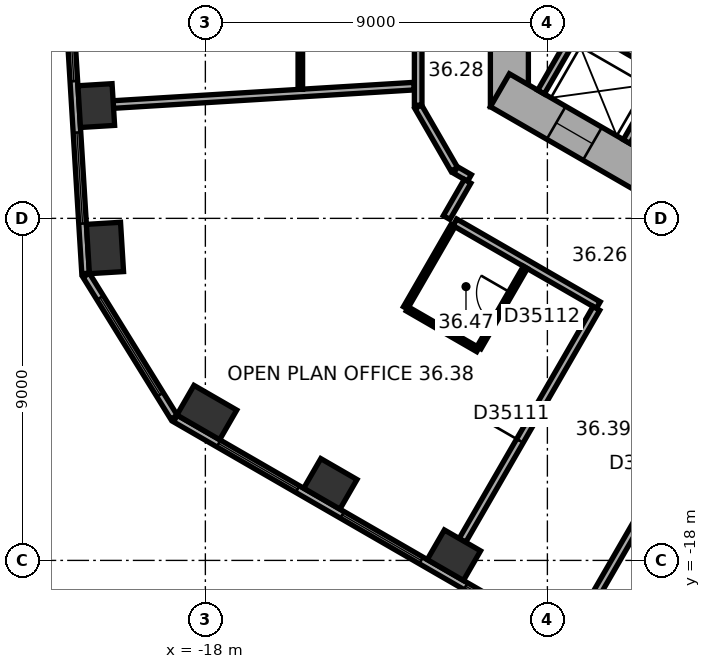
"""IFC4 building model, lengths in metres.
Left out: names, types, materials, properties, quantities, classifications, styles, units other than length and angle.
Written with IfcOpenShell. Run it as: python <this file> out.ifc"""

import sys

from ifc_helpers import new_model, si_unit, direction, frame, frame_2d, origin, origin_2d, place, context, subcontext, project, spatial, rectangle, extrude, element, fill, save


model = new_model("IFC4")
c1 = context("Model", 3, precision=1e-05, world=origin(), true_north=direction((0.0, 1.0)))
c2 = subcontext(c1, "Body", "Model", "MODEL_VIEW")
j1 = project(units=[si_unit("LENGTHUNIT", "METRE"), si_unit("PLANEANGLEUNIT", "RADIAN")], contexts=[c1])
p1 = place(None, origin())
s1 = spatial("IfcSite", under=j1, at=p1, CompositionType="ELEMENT")
p2 = place(p1, origin())
s2 = spatial("IfcBuilding", under=s1, at=p2, CompositionType="ELEMENT")
p3 = place(p2, frame((0.0, 0.0, 150.3)))
s3 = spatial("IfcBuildingStorey", under=s2, at=p3, CompositionType="ELEMENT", Elevation=150.3)
p4 = place(p3, frame((-20.871, -6.032, 0.0), z_axis=(0.0, 0.0, 1.0), x_axis=(0.061048539535, -0.998134798422, 0.0)))
e1 = element("IfcColumn", 1, at=p4, inside=s3, PredefinedType="COLUMN", context=c2, shape_type="SweptSolid", body=[
    extrude(rectangle(XDim=1.1, YDim=0.9, at=origin_2d()), origin(), (0.0, 0.0, 1.0), 3.7),
])
for number, where, z_axis, x_axis in (
    (2, (-20.642, -9.779, 0.0), (0.0, 0.0, 1.0), (0.061, -0.998, 0.0)),
    (3, (-17.962, -14.109, 0.0), (0.0, 0.0, 1.0), (0.866, -0.5, 0.0)),
):
    element("IfcColumn", number, at=place(p3, frame(where, z_axis=z_axis, x_axis=x_axis)), inside=s3, PredefinedType="COLUMN", context=c2, shape_type="SweptSolid", body=[
        extrude(rectangle(XDim=1.3, YDim=0.9, at=origin_2d()), origin(), (0.0, 0.0, 1.0), 3.7),
    ])
for number, where, z_axis, x_axis in (
    (4, (-14.711, -15.986, 0.0), (0.0, 0.0, 1.0), (0.866, -0.5, 0.0)),
    (5, (-11.46, -17.863, 0.0), (0.0, 0.0, 1.0), (0.866, -0.5, 0.0)),
):
    element("IfcColumn", number, at=place(p3, frame(where, z_axis=z_axis, x_axis=x_axis)), inside=s3, PredefinedType="COLUMN", context=c2, shape_type="SweptSolid", body=[
        extrude(rectangle(XDim=1.1, YDim=0.9, at=origin_2d()), origin(), (0.0, 0.0, 1.0), 3.7),
    ])
p5 = place(p3, frame((-10.0, 6.062, 0.0), z_axis=(0.0, 0.0, 1.0), x_axis=(0.0, -1.0, 0.0)))
e6 = element("IfcWall", 6, at=p5, inside=s3, PredefinedType="SHEAR", context=c2, shape_type="SweptSolid", body=[
    extrude(rectangle(XDim=12.125, YDim=1.0, at=frame_2d((6.062, 0.0))), origin(), (0.0, 0.0, 1.0), 3.7),
])
p6 = place(p5, frame((5.212, 0.0, 0.0)))
e7 = element("IfcOpeningElement", 7, at=p6, cuts=e6, PredefinedType="OPENING", context=c2, shape_type="SweptSolid", body=[
    extrude(rectangle(XDim=1.1, YDim=2.1, at=frame_2d((0.55, 1.05))), frame((0.0, 0.51, 0.0), z_axis=(0.0, -1.0, 0.0), x_axis=(1.0, 0.0, 0.0)), (0.0, 0.0, 1.0), 1.02),
])
p7 = place(p5, frame((7.812, 0.0, 0.0)))
e8 = element("IfcOpeningElement", 8, at=p7, cuts=e6, PredefinedType="OPENING", context=c2, shape_type="SweptSolid", body=[
    extrude(rectangle(XDim=1.1, YDim=2.1, at=frame_2d((0.55, 1.05))), frame((0.0, 0.51, 0.0), z_axis=(0.0, -1.0, 0.0), x_axis=(1.0, 0.0, 0.0)), (0.0, 0.0, 1.0), 1.02),
])
p8 = place(p3, frame((-10.25, -5.629, 0.0), z_axis=(0.0, 0.0, 1.0), x_axis=(0.866022616891, -0.50000482701, 0.0)))
e9 = element("IfcWall", 9, at=p8, inside=s3, PredefinedType="SHEAR", context=c2, shape_type="SweptSolid", body=[
    extrude(rectangle(XDim=12.125, YDim=1.0, at=frame_2d((6.062, 0.0))), origin(), (0.0, 0.0, 1.0), 3.7),
])
p9 = place(p8, frame((6.262, 0.0, 0.0)))
e10 = element("IfcOpeningElement", 10, at=p9, cuts=e9, PredefinedType="OPENING", context=c2, shape_type="SweptSolid", body=[
    extrude(rectangle(XDim=1.5, YDim=2.1, at=frame_2d((0.75, 1.05))), frame((0.0, 0.51, 0.0), z_axis=(0.0, -1.0, 0.0), x_axis=(1.0, 0.0, 0.0)), (0.0, 0.0, 1.0), 1.02),
])
p10 = place(p8, frame((1.712, 0.0, 0.0)))
e11 = element("IfcOpeningElement", 11, at=p10, cuts=e9, PredefinedType="OPENING", context=c2, shape_type="SweptSolid", body=[
    extrude(rectangle(XDim=1.1, YDim=2.1, at=frame_2d((0.55, 1.05))), frame((0.0, 0.51, 0.0), z_axis=(0.0, -1.0, 0.0), x_axis=(1.0, 0.0, 0.0)), (0.0, 0.0, 1.0), 1.02),
])
p11 = place(p8, frame((4.312, 0.0, 0.0)))
e12 = element("IfcOpeningElement", 12, at=p11, cuts=e9, PredefinedType="OPENING", context=c2, shape_type="SweptSolid", body=[
    extrude(rectangle(XDim=1.1, YDim=2.1, at=frame_2d((0.55, 1.05))), frame((0.0, 0.51, 0.0), z_axis=(0.0, -1.0, 0.0), x_axis=(1.0, 0.0, 0.0)), (0.0, 0.0, 1.0), 1.02),
])
p12 = place(p3, frame((-22.375, 9.557, 0.0), z_axis=(0.0, 0.0, 1.0), x_axis=(0.061036015339, -0.998135564356, 0.0)))
e13 = element("IfcWall", 13, at=p12, inside=s3, PredefinedType="STANDARD", context=c2, shape_type="SweptSolid", body=[
    extrude(rectangle(XDim=20.044, YDim=0.2, at=frame_2d((10.022, 0.0))), origin(), (0.0, 0.0, 1.0), 3.7),
])
p13 = place(p12, frame((1.313, 0.0, 0.9)))
e14 = element("IfcOpeningElement", 14, at=p13, cuts=e13, PredefinedType="OPENING", context=c2, shape_type="SweptSolid", body=[
    extrude(rectangle(XDim=2.4, YDim=2.0, at=frame_2d((1.2, 1.0))), frame((0.0, 0.11, 0.0), z_axis=(0.0, -1.0, 0.0), x_axis=(1.0, 0.0, 0.0)), (0.0, 0.0, 1.0), 0.22),
])
p14 = place(p12, frame((5.067, 0.0, 0.9)))
e15 = element("IfcOpeningElement", 15, at=p14, cuts=e13, PredefinedType="OPENING", context=c2, shape_type="SweptSolid", body=[
    extrude(rectangle(XDim=2.4, YDim=2.0, at=frame_2d((1.2, 1.0))), frame((0.0, 0.11, 0.0), z_axis=(0.0, -1.0, 0.0), x_axis=(1.0, 0.0, 0.0)), (0.0, 0.0, 1.0), 0.22),
])
p15 = place(p12, frame((8.821, 0.0, 0.9)))
e16 = element("IfcOpeningElement", 16, at=p15, cuts=e13, PredefinedType="OPENING", context=c2, shape_type="SweptSolid", body=[
    extrude(rectangle(XDim=2.4, YDim=2.0, at=frame_2d((1.2, 1.0))), frame((0.0, 0.11, 0.0), z_axis=(0.0, -1.0, 0.0), x_axis=(1.0, 0.0, 0.0)), (0.0, 0.0, 1.0), 0.22),
])
p16 = place(p12, frame((12.575, 0.0, 0.9)))
e17 = element("IfcOpeningElement", 17, at=p16, cuts=e13, PredefinedType="OPENING", context=c2, shape_type="SweptSolid", body=[
    extrude(rectangle(XDim=2.4, YDim=2.0, at=frame_2d((1.2, 1.0))), frame((0.0, 0.11, 0.0), z_axis=(0.0, -1.0, 0.0), x_axis=(1.0, 0.0, 0.0)), (0.0, 0.0, 1.0), 0.22),
])
p17 = place(p12, frame((16.329, 0.0, 0.9)))
e18 = element("IfcOpeningElement", 18, at=p17, cuts=e13, PredefinedType="OPENING", context=c2, shape_type="SweptSolid", body=[
    extrude(rectangle(XDim=2.4, YDim=2.0, at=frame_2d((1.2, 1.0))), frame((0.0, 0.11, 0.0), z_axis=(0.0, -1.0, 0.0), x_axis=(1.0, 0.0, 0.0)), (0.0, 0.0, 1.0), 0.22),
])
p18 = place(p3, frame((-21.137, -10.496, 0.0), z_axis=(0.0, 0.0, 1.0), x_axis=(0.526178661629, -0.850374044786, 0.0)))
e19 = element("IfcWall", 19, at=p18, inside=s3, PredefinedType="STANDARD", context=c2, shape_type="SweptSolid", body=[
    extrude(rectangle(XDim=4.395, YDim=0.2, at=frame_2d((2.197, 0.0))), origin(), (0.0, 0.0, 1.0), 3.7),
])
p19 = place(p18, frame((0.698, 0.0, 0.9)))
e20 = element("IfcOpeningElement", 20, at=p19, cuts=e19, PredefinedType="OPENING", context=c2, shape_type="SweptSolid", body=[
    extrude(rectangle(XDim=3.0, YDim=2.0, at=frame_2d((1.5, 1.0))), frame((0.0, 0.11, 0.0), z_axis=(0.0, -1.0, 0.0), x_axis=(1.0, 0.0, 0.0)), (0.0, 0.0, 1.0), 0.22),
])
p20 = place(p3, frame((-18.789, -14.267, 0.0), z_axis=(0.0, 0.0, 1.0), x_axis=(0.866023315909, -0.500003616288, 0.0)))
e21 = element("IfcWall", 21, at=p20, inside=s3, PredefinedType="STANDARD", context=c2, shape_type="SweptSolid", body=[
    extrude(rectangle(XDim=20.044, YDim=0.2, at=frame_2d((10.022, 0.0))), origin(), (0.0, 0.0, 1.0), 3.7),
])
p21 = place(p20, frame((1.314, 0.0, 0.9)))
e22 = element("IfcOpeningElement", 22, at=p21, cuts=e21, PredefinedType="OPENING", context=c2, shape_type="SweptSolid", body=[
    extrude(rectangle(XDim=2.4, YDim=2.0, at=frame_2d((1.2, 1.0))), frame((0.0, 0.11, 0.0), z_axis=(0.0, -1.0, 0.0), x_axis=(1.0, 0.0, 0.0)), (0.0, 0.0, 1.0), 0.22),
])
p22 = place(p20, frame((5.069, 0.0, 0.9)))
e23 = element("IfcOpeningElement", 23, at=p22, cuts=e21, PredefinedType="OPENING", context=c2, shape_type="SweptSolid", body=[
    extrude(rectangle(XDim=2.4, YDim=2.0, at=frame_2d((1.2, 1.0))), frame((0.0, 0.11, 0.0), z_axis=(0.0, -1.0, 0.0), x_axis=(1.0, 0.0, 0.0)), (0.0, 0.0, 1.0), 0.22),
])
p23 = place(p20, frame((8.823, 0.0, 0.9)))
e24 = element("IfcOpeningElement", 24, at=p23, cuts=e21, PredefinedType="OPENING", context=c2, shape_type="SweptSolid", body=[
    extrude(rectangle(XDim=2.4, YDim=2.0, at=frame_2d((1.2, 1.0))), frame((0.0, 0.11, 0.0), z_axis=(0.0, -1.0, 0.0), x_axis=(1.0, 0.0, 0.0)), (0.0, 0.0, 1.0), 0.22),
])
p24 = place(p20, frame((12.577, 0.0, 0.9)))
e25 = element("IfcOpeningElement", 25, at=p24, cuts=e21, PredefinedType="OPENING", context=c2, shape_type="SweptSolid", body=[
    extrude(rectangle(XDim=2.4, YDim=2.0, at=frame_2d((1.2, 1.0))), frame((0.0, 0.11, 0.0), z_axis=(0.0, -1.0, 0.0), x_axis=(1.0, 0.0, 0.0)), (0.0, 0.0, 1.0), 0.22),
])
p25 = place(p20, frame((16.331, 0.0, 0.9)))
e26 = element("IfcOpeningElement", 26, at=p25, cuts=e21, PredefinedType="OPENING", context=c2, shape_type="SweptSolid", body=[
    extrude(rectangle(XDim=2.4, YDim=2.0, at=frame_2d((1.2, 1.0))), frame((0.0, 0.11, 0.0), z_axis=(0.0, -1.0, 0.0), x_axis=(1.0, 0.0, 0.0)), (0.0, 0.0, 1.0), 0.22),
])
p26 = place(p3, frame((-8.203, -3.809, 0.0), z_axis=(0.0, 0.0, 1.0), x_axis=(0.866028230842, -0.499995103361, 0.0)))
e27 = element("IfcWall", 27, at=p26, inside=s3, PredefinedType="PARTITIONING", context=c2, shape_type="SweptSolid", body=[
    extrude(rectangle(XDim=5.4, YDim=0.2, at=frame_2d((2.7, 0.0))), origin(), (0.0, 0.0, 1.0), 3.42),
])
for number, where, z_axis, x_axis in (
    (28, (-8.067, -3.772, 0.0), (0.0, 0.0, 1.0), (-0.5, -0.866, 0.0)),
    (29, (-5.815, -5.072, 0.0), (0.0, 0.0, 1.0), (-0.5, -0.866, 0.0)),
):
    element("IfcWall", number, at=place(p3, frame(where, z_axis=z_axis, x_axis=x_axis)), inside=s3, PredefinedType="PARTITIONING", context=c2, shape_type="SweptSolid", body=[
        extrude(rectangle(XDim=2.2, YDim=0.2, at=frame_2d((1.1, 0.0))), origin(), (0.0, 0.0, 1.0), 3.42),
    ])
p27 = place(p3, frame((-20.421, -6.005, 0.0), z_axis=(0.0, 0.0, 1.0), x_axis=(0.998134865741, 0.061047438866, 0.0)))
e30 = element("IfcWall", 30, at=p27, inside=s3, PredefinedType="PARTITIONING", context=c2, shape_type="SweptSolid", body=[
    extrude(rectangle(XDim=7.927, YDim=0.2, at=frame_2d((3.963, 0.0))), origin(), (0.0, 0.0, 1.0), 2.87),
])
p28 = place(p3, frame((-15.501, 5.479, 0.0), z_axis=(0.0, 0.0, 1.0), x_axis=(0.0, -1.0, 0.0)))
e31 = element("IfcWall", 31, at=p28, inside=s3, PredefinedType="PARTITIONING", context=c2, shape_type="SweptSolid", body=[
    extrude(rectangle(XDim=11.083, YDim=0.12, at=frame_2d((5.542, 0.0))), origin(), (0.0, 0.0, 1.0), 3.42),
])
p29 = place(p28, frame((0.55, 0.0, 0.0)))
e32 = element("IfcOpeningElement", 32, at=p29, cuts=e31, PredefinedType="OPENING", context=c2, shape_type="SweptSolid", body=[
    extrude(rectangle(XDim=1.0, YDim=2.1, at=frame_2d((0.5, 1.05))), frame((0.0, 0.07, 0.0), z_axis=(0.0, -1.0, 0.0), x_axis=(1.0, 0.0, 0.0)), (0.0, 0.0, 1.0), 0.14),
])
p30 = place(p28, frame((3.636, 0.0, 0.0)))
e33 = element("IfcOpeningElement", 33, at=p30, cuts=e31, PredefinedType="OPENING", context=c2, shape_type="SweptSolid", body=[
    extrude(rectangle(XDim=0.9, YDim=2.1, at=frame_2d((0.45, 1.05))), frame((0.0, 0.07, 0.0), z_axis=(0.0, -1.0, 0.0), x_axis=(1.0, 0.0, 0.0)), (0.0, 0.0, 1.0), 0.14),
])
p31 = place(p28, frame((8.127, 0.0, 0.0)))
e34 = element("IfcOpeningElement", 34, at=p31, cuts=e31, PredefinedType="OPENING", context=c2, shape_type="SweptSolid", body=[
    extrude(rectangle(XDim=0.9, YDim=2.1, at=frame_2d((0.45, 1.05))), frame((0.0, 0.07, 0.0), z_axis=(0.0, -1.0, 0.0), x_axis=(1.0, 0.0, 0.0)), (0.0, 0.0, 1.0), 0.14),
])
p32 = place(p3, frame((-12.735, -11.355, 0.0), z_axis=(0.0, 0.0, 1.0), x_axis=(0.500004234368, 0.866022959057, 0.0)))
e35 = element("IfcWall", 35, at=p32, inside=s3, PredefinedType="PARTITIONING", context=c2, shape_type="SweptSolid", body=[
    extrude(rectangle(XDim=2.5, YDim=0.12, at=frame_2d((1.25, 0.0))), origin(), (0.0, 0.0, 1.0), 3.42),
])
p33 = place(p3, frame((-12.4, -6.062, 0.0), z_axis=(0.0, 0.0, 1.0), x_axis=(0.500022797313, -0.86601224135, 0.0)))
e36 = element("IfcWall", 36, at=p33, inside=s3, PredefinedType="PARTITIONING", context=c2, shape_type="SweptSolid", body=[
    extrude(rectangle(XDim=1.9, YDim=0.2, at=frame_2d((0.95, 0.0))), origin(), (0.0, 0.0, 1.0), 3.42),
])
p34 = place(p3, frame((-12.4, -4.201, 0.0), z_axis=(0.0, 0.0, 1.0), x_axis=(0.0, -1.0, 0.0)))
e37 = element("IfcWall", 37, at=p34, inside=s3, PredefinedType="PARTITIONING", context=c2, shape_type="SweptSolid", body=[
    extrude(rectangle(XDim=1.821, YDim=0.2, at=frame_2d((0.911, 0.0))), origin(), (0.0, 0.0, 1.0), 3.42),
])
p35 = place(p3, frame((-11.435, -9.103, 0.0), z_axis=(0.0, 0.0, 1.0), x_axis=(0.866007399799, -0.500031182522, 0.0)))
e38 = element("IfcWall", 38, at=p35, inside=s3, PredefinedType="PARTITIONING", context=c2, shape_type="SweptSolid", body=[
    extrude(rectangle(XDim=4.358, YDim=0.2, at=frame_2d((2.179, 0.0))), origin(), (0.0, 0.0, 1.0), 3.42),
])
p36 = place(p3, frame((-11.415, -7.728, 0.0), z_axis=(0.0, 0.0, 1.0), x_axis=(0.865915281873, -0.500190688257, 0.0)))
e39 = element("IfcWall", 39, at=p36, inside=s3, PredefinedType="PARTITIONING", context=c2, shape_type="SweptSolid", body=[
    extrude(rectangle(XDim=0.421, YDim=0.2, at=frame_2d((0.21, 0.0))), origin(), (0.0, 0.0, 1.0), 3.42),
])
p37 = place(p3, frame((-11.235, -17.474, 0.0), z_axis=(0.0, 0.0, 1.0), x_axis=(0.500009260695, 0.866020057054, 0.0)))
e40 = element("IfcWall", 40, at=p37, inside=s3, PredefinedType="PARTITIONING", context=c2, shape_type="SweptSolid", body=[
    extrude(rectangle(XDim=7.049, YDim=0.2, at=frame_2d((3.524, 0.0))), origin(), (0.0, 0.0, 1.0), 2.87),
])
p38 = place(p37, frame((3.024, 0.0, 0.0)))
e41 = element("IfcOpeningElement", 41, at=p38, cuts=e40, PredefinedType="OPENING", context=c2, shape_type="SweptSolid", body=[
    extrude(rectangle(XDim=1.0, YDim=2.1, at=frame_2d((0.5, 1.05))), frame((0.0, 0.11, 0.0), z_axis=(0.0, -1.0, 0.0), x_axis=(1.0, 0.0, 0.0)), (0.0, 0.0, 1.0), 0.22),
])
p39 = place(p3, frame((-11.101, -8.025, 0.0), z_axis=(0.0, 0.0, 1.0), x_axis=(-0.500074377092, -0.865982457891, 0.0)))
e42 = element("IfcWall", 42, at=p39, inside=s3, PredefinedType="PARTITIONING", context=c2, shape_type="SweptSolid", body=[
    extrude(rectangle(XDim=1.101, YDim=0.2, at=frame_2d((0.55, 0.0))), origin(), (0.0, 0.0, 1.0), 3.42),
])
p40 = place(p3, frame((-10.829, -12.455, 0.0), z_axis=(0.0, 0.0, 1.0), x_axis=(-0.86600889856, 0.500028586798, 0.0)))
e43 = element("IfcWall", 43, at=p40, inside=s3, PredefinedType="PARTITIONING", context=c2, shape_type="SweptSolid", body=[
    extrude(rectangle(XDim=2.14, YDim=0.12, at=frame_2d((1.07, 0.0))), origin(), (0.0, 0.0, 1.0), 3.42),
])
p41 = place(p3, frame((-9.579, -10.29, 0.0), z_axis=(0.0, 0.0, 1.0), x_axis=(-0.499959183527, -0.866048967903, 0.0)))
e44 = element("IfcWall", 44, at=p41, inside=s3, PredefinedType="PARTITIONING", context=c2, shape_type="SweptSolid", body=[
    extrude(rectangle(XDim=2.44, YDim=0.12, at=frame_2d((1.22, 0.0))), origin(), (0.0, 0.0, 1.0), 3.42),
])
p42 = place(p41, frame((0.77, 0.0, 0.0)))
e45 = element("IfcOpeningElement", 45, at=p42, cuts=e44, PredefinedType="OPENING", context=c2, shape_type="SweptSolid", body=[
    extrude(rectangle(XDim=0.9, YDim=2.1, at=frame_2d((0.45, 1.05))), frame((0.0, 0.07, 0.0), z_axis=(0.0, -1.0, 0.0), x_axis=(1.0, 0.0, 0.0)), (0.0, 0.0, 1.0), 0.14),
])
p43 = place(p3, frame((-7.984, -19.351, 0.0), z_axis=(0.0, 0.0, 1.0), x_axis=(0.500010139422, 0.866019549707, 0.0)))
e46 = element("IfcWall", 46, at=p43, inside=s3, PredefinedType="PARTITIONING", context=c2, shape_type="SweptSolid", body=[
    extrude(rectangle(XDim=8.35, YDim=0.2, at=frame_2d((4.175, 0.0))), origin(), (0.0, 0.0, 1.0), 3.42),
])
p44 = place(p43, frame((3.675, 0.0, 0.0)))
e47 = element("IfcOpeningElement", 47, at=p44, cuts=e46, PredefinedType="OPENING", context=c2, shape_type="SweptSolid", body=[
    extrude(rectangle(XDim=1.0, YDim=2.1, at=frame_2d((0.5, 1.05))), frame((0.0, 0.11, 0.0), z_axis=(0.0, -1.0, 0.0), x_axis=(1.0, 0.0, 0.0)), (0.0, 0.0, 1.0), 0.22),
])
p45 = place(p16, origin())
e48 = element("IfcWindow", 48, at=p45, inside=s3, PartitioningType="SINGLE_PANEL", PredefinedType="WINDOW", context=c2, shape_type="SweptSolid", body=[
    extrude(rectangle(XDim=2.4, YDim=2.0, at=frame_2d((1.2, 1.0))), frame((0.0, 0.03, 0.0), z_axis=(0.0, -1.0, 0.0), x_axis=(1.0, 0.0, 0.0)), (0.0, 0.0, 1.0), 0.06),
])
fill(e17, e48)
p46 = place(p17, origin())
e49 = element("IfcWindow", 49, at=p46, inside=s3, PartitioningType="SINGLE_PANEL", PredefinedType="WINDOW", context=c2, shape_type="SweptSolid", body=[
    extrude(rectangle(XDim=2.4, YDim=2.0, at=frame_2d((1.2, 1.0))), frame((0.0, 0.03, 0.0), z_axis=(0.0, -1.0, 0.0), x_axis=(1.0, 0.0, 0.0)), (0.0, 0.0, 1.0), 0.06),
])
fill(e18, e49)
p47 = place(p19, origin())
e50 = element("IfcWindow", 50, at=p47, inside=s3, PartitioningType="SINGLE_PANEL", PredefinedType="WINDOW", context=c2, shape_type="SweptSolid", body=[
    extrude(rectangle(XDim=3.0, YDim=2.0, at=frame_2d((1.5, 1.0))), frame((0.0, 0.03, 0.0), z_axis=(0.0, -1.0, 0.0), x_axis=(1.0, 0.0, 0.0)), (0.0, 0.0, 1.0), 0.06),
])
fill(e20, e50)
p48 = place(p21, origin())
e51 = element("IfcWindow", 51, at=p48, inside=s3, PartitioningType="SINGLE_PANEL", PredefinedType="WINDOW", context=c2, shape_type="SweptSolid", body=[
    extrude(rectangle(XDim=2.4, YDim=2.0, at=frame_2d((1.2, 1.0))), frame((0.0, 0.03, 0.0), z_axis=(0.0, -1.0, 0.0), x_axis=(1.0, 0.0, 0.0)), (0.0, 0.0, 1.0), 0.06),
])
fill(e22, e51)
p49 = place(p22, origin())
e52 = element("IfcWindow", 52, at=p49, inside=s3, PartitioningType="SINGLE_PANEL", PredefinedType="WINDOW", context=c2, shape_type="SweptSolid", body=[
    extrude(rectangle(XDim=2.4, YDim=2.0, at=frame_2d((1.2, 1.0))), frame((0.0, 0.03, 0.0), z_axis=(0.0, -1.0, 0.0), x_axis=(1.0, 0.0, 0.0)), (0.0, 0.0, 1.0), 0.06),
])
fill(e23, e52)
p50 = place(p23, origin())
e53 = element("IfcWindow", 53, at=p50, inside=s3, PartitioningType="SINGLE_PANEL", PredefinedType="WINDOW", context=c2, shape_type="SweptSolid", body=[
    extrude(rectangle(XDim=2.4, YDim=2.0, at=frame_2d((1.2, 1.0))), frame((0.0, 0.03, 0.0), z_axis=(0.0, -1.0, 0.0), x_axis=(1.0, 0.0, 0.0)), (0.0, 0.0, 1.0), 0.06),
])
fill(e24, e53)
p51 = place(p10, origin())
e54 = element("IfcDoor", 54, at=p51, inside=s3, OperationType="DOUBLE_DOOR_SLIDING", PredefinedType="DOOR", context=c2, shape_type="SweptSolid", body=[
    extrude(rectangle(XDim=1.1, YDim=2.1, at=frame_2d((0.55, 1.05))), frame((0.0, 0.025, 0.0), z_axis=(0.0, -1.0, 0.0), x_axis=(1.0, 0.0, 0.0)), (0.0, 0.0, 1.0), 0.05),
])
fill(e11, e54)
p52 = place(p38, origin())
e55 = element("IfcDoor", 55, at=p52, inside=s3, OperationType="SINGLE_SWING_LEFT", PredefinedType="DOOR", context=c2, shape_type="SweptSolid", body=[
    extrude(rectangle(XDim=1.0, YDim=2.1, at=frame_2d((0.5, 1.05))), frame((0.0, 0.025, 0.0), z_axis=(0.0, -1.0, 0.0), x_axis=(1.0, 0.0, 0.0)), (0.0, 0.0, 1.0), 0.05),
])
fill(e41, e55)
p53 = place(p42, origin())
e56 = element("IfcDoor", 56, at=p53, inside=s3, OperationType="SINGLE_SWING_LEFT", PredefinedType="DOOR", context=c2, shape_type="SweptSolid", body=[
    extrude(rectangle(XDim=0.9, YDim=2.1, at=frame_2d((0.45, 1.05))), frame((0.0, 0.025, 0.0), z_axis=(0.0, -1.0, 0.0), x_axis=(1.0, 0.0, 0.0)), (0.0, 0.0, 1.0), 0.05),
])
fill(e45, e56)
save(model, sys.argv[1])
